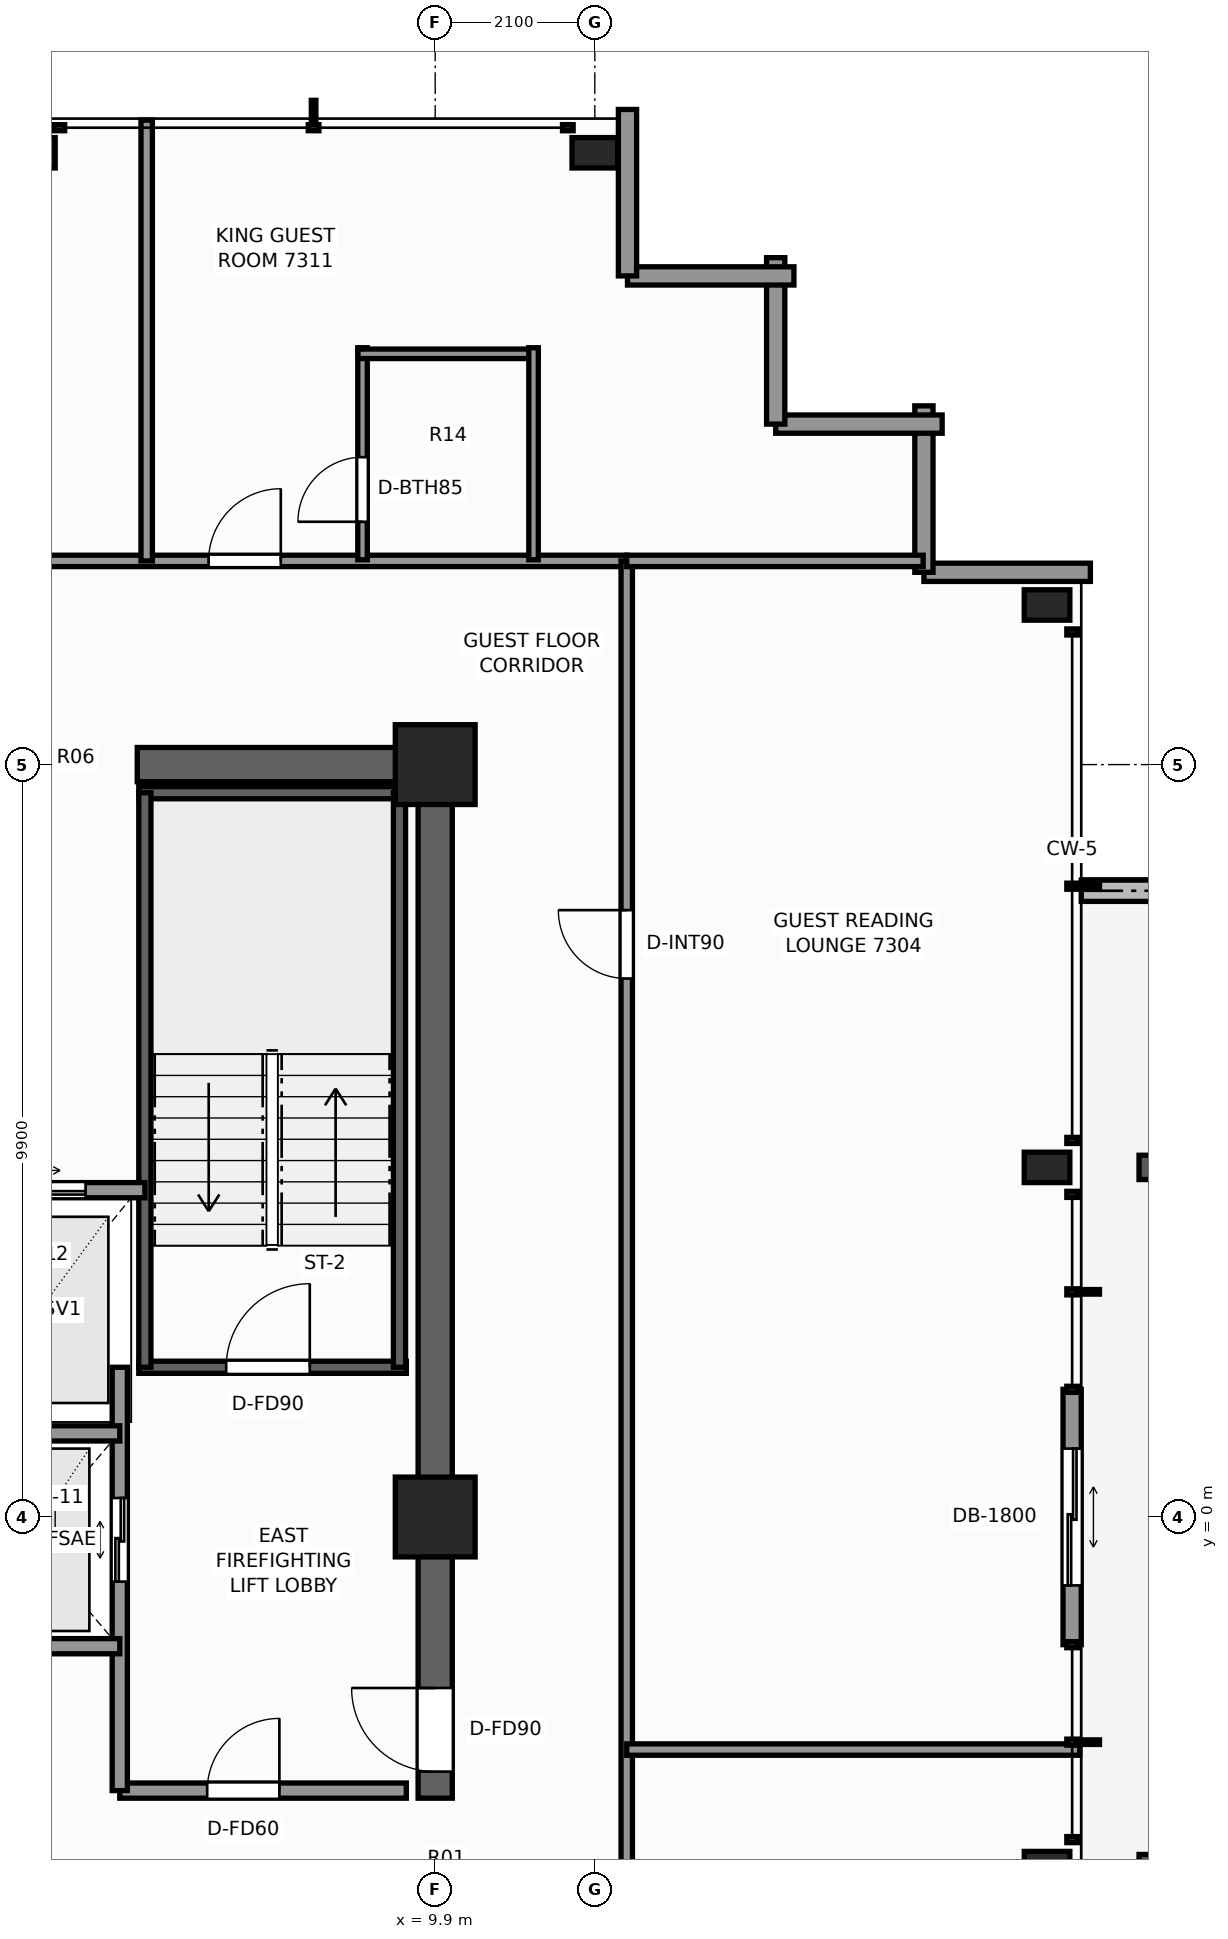
"""IFC4 building model, lengths in metres.
Left out: names, types, materials, properties, quantities, classifications, styles, units other than length and angle.
Written with IfcOpenShell. Run it as: python <this file> out.ifc"""

import sys

from ifc_helpers import new_model, si_unit, direction, frame, frame_2d, origin, origin_2d, place, context, subcontext, project, spatial, rectangle, extrude, element, fill, save


model = new_model("IFC4")
c1 = context("Model", 3, precision=1e-05, world=origin(), true_north=direction((0.0, 1.0)))
c2 = subcontext(c1, "Body", "Model", "MODEL_VIEW")
j1 = project(units=[si_unit("LENGTHUNIT", "METRE"), si_unit("PLANEANGLEUNIT", "RADIAN")], contexts=[c1])
p1 = place(None, origin())
s1 = spatial("IfcSite", under=j1, at=p1, CompositionType="ELEMENT")
p2 = place(p1, origin())
s2 = spatial("IfcBuilding", under=s1, at=p2, CompositionType="ELEMENT")
p3 = place(p2, frame((0.0, 0.0, 251.4)))
s3 = spatial("IfcBuildingStorey", under=s2, at=p3, CompositionType="ELEMENT", Elevation=251.4)
p4 = place(p3, frame((5.98, 9.9, 0.0), z_axis=(0.0, 0.0, 1.0), x_axis=(1.0, 0.0, 0.0)))
e1 = element("IfcWall", 1, at=p4, inside=s3, PredefinedType="SHEAR", context=c2, shape_type="SweptSolid", body=[
    extrude(rectangle(XDim=4.145, YDim=0.45, at=frame_2d((2.073, 0.0))), origin(), (0.0, 0.0, 1.0), 3.5),
])
p5 = place(p3, frame((9.9, -3.7, 0.0), z_axis=(0.0, 0.0, 1.0), x_axis=(0.0, 1.0, 0.0)))
e2 = element("IfcWall", 2, at=p5, inside=s3, PredefinedType="SHEAR", context=c2, shape_type="SweptSolid", body=[
    extrude(rectangle(XDim=13.375, YDim=0.45, at=frame_2d((6.688, 0.0))), origin(), (0.0, 0.0, 1.0), 3.5),
])
p6 = place(p5, frame((0.35, 0.0, 0.0)))
e3 = element("IfcOpeningElement", 3, at=p6, cuts=e2, PredefinedType="OPENING", context=c2, shape_type="SweptSolid", body=[
    extrude(rectangle(XDim=1.1, YDim=2.2, at=frame_2d((0.55, 1.1))), frame((0.0, 0.235, 0.0), z_axis=(0.0, -1.0, 0.0), x_axis=(1.0, 0.0, 0.0)), (0.0, 0.0, 1.0), 0.47),
])
for number, where, z_axis, x_axis in (
    (4, (9.9, 9.9, 0.0), (0.0, 0.0, 1.0), (1.0, 0.0, 0.0)),
    (5, (9.9, 0.0, 0.0), (0.0, 0.0, 1.0), (1.0, 0.0, 0.0)),
):
    element("IfcColumn", number, at=place(p3, frame(where, z_axis=z_axis, x_axis=x_axis)), inside=s3, PredefinedType="COLUMN", context=c2, shape_type="SweptSolid", body=[
        extrude(rectangle(XDim=1.05, YDim=1.05, at=origin_2d()), origin(), (0.0, 0.0, 1.0), 3.5),
    ])
for number, where, z_axis, x_axis in (
    (6, (4.6, 17.95, 0.0), (0.0, 0.0, 1.0), (1.0, 0.0, 0.0)),
    (7, (12.0, 17.95, 0.0), (0.0, 0.0, 1.0), (1.0, 0.0, 0.0)),
    (8, (17.95, -4.6, 0.0), (0.0, 0.0, 1.0), (1.0, 0.0, 0.0)),
    (9, (17.95, 4.6, 0.0), (0.0, 0.0, 1.0), (1.0, 0.0, 0.0)),
    (10, (17.95, 12.0, 0.0), (0.0, 0.0, 1.0), (1.0, 0.0, 0.0)),
):
    element("IfcColumn", number, at=place(p3, frame(where, z_axis=z_axis, x_axis=x_axis)), inside=s3, PredefinedType="COLUMN", context=c2, shape_type="SweptSolid", body=[
        extrude(rectangle(XDim=0.6, YDim=0.4, at=origin_2d()), origin(), (0.0, 0.0, 1.0), 3.5),
    ])
p7 = place(p3, frame((20.105, 8.24, -0.07), z_axis=(0.0, 0.0, 1.0), x_axis=(-1.0, 0.0, 0.0)))
e11 = element("IfcWall", 11, at=p7, inside=s3, PredefinedType="PARAPET", context=c2, shape_type="SweptSolid", body=[
    extrude(rectangle(XDim=1.705, YDim=0.28, at=frame_2d((0.853, 0.0))), origin(), (0.0, 0.0, 1.0), 0.42),
])
p8 = place(p3, frame((18.28, 1.68, 0.0), z_axis=(0.0, 0.0, 1.0), x_axis=(0.0, -1.0, 0.0)))
e12 = element("IfcWall", 12, at=p8, inside=s3, PredefinedType="STANDARD", context=c2, shape_type="SweptSolid", body=[
    extrude(rectangle(XDim=3.36, YDim=0.24, at=frame_2d((1.68, 0.0))), origin(), (0.0, 0.0, 1.0), 3.25),
])
p9 = place(p8, frame((0.78, 0.0, 0.0)))
e13 = element("IfcOpeningElement", 13, at=p9, cuts=e12, PredefinedType="OPENING", context=c2, shape_type="SweptSolid", body=[
    extrude(rectangle(XDim=1.8, YDim=2.2, at=frame_2d((0.9, 1.1))), frame((0.0, 0.13, 0.0), z_axis=(0.0, -1.0, 0.0), x_axis=(1.0, 0.0, 0.0)), (0.0, 0.0, 1.0), 0.26),
])
p10 = place(p3, frame((16.33, 12.43, 0.0), z_axis=(0.0, 0.0, 1.0), x_axis=(1.0, 0.0, 0.0)))
e14 = element("IfcWall", 14, at=p10, inside=s3, PredefinedType="STANDARD", context=c2, shape_type="SweptSolid", body=[
    extrude(rectangle(XDim=2.19, YDim=0.24, at=frame_2d((1.095, 0.0))), origin(), (0.0, 0.0, 1.0), 2.633),
])
for number, where, z_axis, x_axis in (
    (15, (16.33, 14.62, 0.0), (0.0, 0.0, 1.0), (0.0, -1.0, 0.0)),
    (16, (14.38, 14.38, 0.0), (0.0, 0.0, 1.0), (1.0, 0.0, 0.0)),
    (17, (14.38, 16.57, 0.0), (0.0, 0.0, 1.0), (0.0, -1.0, 0.0)),
    (18, (12.43, 16.33, 0.0), (0.0, 0.0, 1.0), (1.0, 0.0, 0.0)),
):
    element("IfcWall", number, at=place(p3, frame(where, z_axis=z_axis, x_axis=x_axis)), inside=s3, PredefinedType="STANDARD", context=c2, shape_type="SweptSolid", body=[
        extrude(rectangle(XDim=2.19, YDim=0.24, at=frame_2d((1.095, 0.0))), origin(), (0.0, 0.0, 1.0), 2.633),
    ])
p11 = place(p3, frame((12.43, 18.52, 0.0), z_axis=(0.0, 0.0, 1.0), x_axis=(0.0, -1.0, 0.0)))
e19 = element("IfcWall", 19, at=p11, inside=s3, PredefinedType="STANDARD", context=c2, shape_type="SweptSolid", body=[
    extrude(rectangle(XDim=2.19, YDim=0.24, at=frame_2d((1.095, 0.0))), origin(), (0.0, 0.0, 1.0), 2.633),
])
p12 = place(p3, frame((6.0, 1.97, 0.0), z_axis=(0.0, 0.0, 1.0), x_axis=(1.0, 0.0, 0.0)))
e20 = element("IfcWall", 20, at=p12, inside=s3, PredefinedType="SHEAR", context=c2, shape_type="SweptSolid", body=[
    extrude(rectangle(XDim=3.52, YDim=0.16, at=frame_2d((1.76, 0.0))), origin(), (0.0, 0.0, 1.0), 3.5),
])
p13 = place(p12, frame((1.15, 0.0, 0.0)))
e21 = element("IfcOpeningElement", 21, at=p13, cuts=e20, PredefinedType="OPENING", context=c2, shape_type="SweptSolid", body=[
    extrude(rectangle(XDim=1.1, YDim=2.2, at=frame_2d((0.55, 1.1))), frame((0.0, 0.09, 0.0), z_axis=(0.0, -1.0, 0.0), x_axis=(1.0, 0.0, 0.0)), (0.0, 0.0, 1.0), 0.18),
])
p14 = place(p3, frame((6.0, 9.53, 0.0), z_axis=(0.0, 0.0, 1.0), x_axis=(1.0, 0.0, 0.0)))
e22 = element("IfcWall", 22, at=p14, inside=s3, PredefinedType="SHEAR", context=c2, shape_type="SweptSolid", body=[
    extrude(rectangle(XDim=3.52, YDim=0.16, at=frame_2d((1.76, 0.0))), origin(), (0.0, 0.0, 1.0), 3.5),
])
for number, where, z_axis, x_axis in (
    (23, (6.08, 1.97, 0.0), (0.0, 0.0, 1.0), (0.0, 1.0, 0.0)),
    (24, (9.43, 1.97, 0.0), (0.0, 0.0, 1.0), (0.0, 1.0, 0.0)),
):
    element("IfcWall", number, at=place(p3, frame(where, z_axis=z_axis, x_axis=x_axis)), inside=s3, PredefinedType="SHEAR", context=c2, shape_type="SweptSolid", body=[
        extrude(rectangle(XDim=7.56, YDim=0.16, at=frame_2d((3.78, 0.0))), origin(), (0.0, 0.0, 1.0), 3.5),
    ])
p15 = place(p3, frame((5.75, -3.6, 0.0), z_axis=(0.0, 0.0, 1.0), x_axis=(1.0, 0.0, 0.0)))
e25 = element("IfcWall", 25, at=p15, inside=s3, PredefinedType="SOLIDWALL", context=c2, shape_type="SweptSolid", body=[
    extrude(rectangle(XDim=3.77, YDim=0.2, at=frame_2d((1.885, 0.0))), origin(), (0.0, 0.0, 1.0), 3.25),
])
p16 = place(p15, frame((1.15, 0.0, 0.0)))
e26 = element("IfcOpeningElement", 26, at=p16, cuts=e25, PredefinedType="OPENING", context=c2, shape_type="SweptSolid", body=[
    extrude(rectangle(XDim=0.95, YDim=2.06, at=frame_2d((0.475, 1.03))), frame((0.0, 0.11, 0.0), z_axis=(0.0, -1.0, 0.0), x_axis=(1.0, 0.0, 0.0)), (0.0, 0.0, 1.0), 0.22),
])
p17 = place(p3, frame((5.75, -3.6, 0.0), z_axis=(0.0, 0.0, 1.0), x_axis=(0.0, 1.0, 0.0)))
e27 = element("IfcWall", 27, at=p17, inside=s3, PredefinedType="SOLIDWALL", context=c2, shape_type="SweptSolid", body=[
    extrude(rectangle(XDim=5.57, YDim=0.2, at=frame_2d((2.785, 0.0))), origin(), (0.0, 0.0, 1.0), 3.25),
])
p18 = place(p17, frame((2.75, 0.0, 0.0)))
e28 = element("IfcOpeningElement", 28, at=p18, cuts=e27, PredefinedType="OPENING", context=c2, shape_type="SweptSolid", body=[
    extrude(rectangle(XDim=1.1, YDim=2.2, at=frame_2d((0.55, 1.1))), frame((0.0, 0.11, 0.0), z_axis=(0.0, -1.0, 0.0), x_axis=(1.0, 0.0, 0.0)), (0.0, 0.0, 1.0), 0.22),
])
for number, where, z_axis, x_axis in (
    (29, (3.35, -1.7, 0.0), (0.0, 0.0, 1.0), (1.0, 0.0, 0.0)),
    (30, (3.35, 1.1, 0.0), (0.0, 0.0, 1.0), (1.0, 0.0, 0.0)),
):
    element("IfcWall", number, at=place(p3, frame(where, z_axis=z_axis, x_axis=x_axis)), inside=s3, PredefinedType="SOLIDWALL", context=c2, shape_type="SweptSolid", body=[
        extrude(rectangle(XDim=2.4, YDim=0.2, at=frame_2d((1.2, 0.0))), origin(), (0.0, 0.0, 1.0), 3.25),
    ])
p19 = place(p3, frame((3.35, 4.3, 0.0), z_axis=(0.0, 0.0, 1.0), x_axis=(1.0, 0.0, 0.0)))
e31 = element("IfcWall", 31, at=p19, inside=s3, PredefinedType="SOLIDWALL", context=c2, shape_type="SweptSolid", body=[
    extrude(rectangle(XDim=2.73, YDim=0.2, at=frame_2d((1.365, 0.0))), origin(), (0.0, 0.0, 1.0), 3.25),
])
p20 = place(p19, frame((0.75, 0.0, 0.0)))
e32 = element("IfcOpeningElement", 32, at=p20, cuts=e31, PredefinedType="OPENING", context=c2, shape_type="SweptSolid", body=[
    extrude(rectangle(XDim=1.2, YDim=2.25, at=frame_2d((0.6, 1.125))), frame((0.0, 0.11, 0.0), z_axis=(0.0, -1.0, 0.0), x_axis=(1.0, 0.0, 0.0)), (0.0, 0.0, 1.0), 0.22),
])
p21 = place(p3, frame((-12.26, 12.58, 0.0), z_axis=(0.0, 0.0, 1.0), x_axis=(1.0, 0.0, 0.0)))
e33 = element("IfcWall", 33, at=p21, inside=s3, PredefinedType="PARTITIONING", context=c2, shape_type="SweptSolid", body=[
    extrude(rectangle(XDim=24.68, YDim=0.15, at=frame_2d((12.34, 0.0))), origin(), (0.0, 0.0, 1.0), 2.539),
])
p22 = place(p21, frame((3.188, 0.0, 0.0)))
e34 = element("IfcOpeningElement", 34, at=p22, cuts=e33, PredefinedType="OPENING", context=c2, shape_type="SweptSolid", body=[
    extrude(rectangle(XDim=0.95, YDim=2.06, at=frame_2d((0.475, 1.03))), frame((0.0, 0.085, 0.0), z_axis=(0.0, -1.0, 0.0), x_axis=(1.0, 0.0, 0.0)), (0.0, 0.0, 1.0), 0.17),
])
p23 = place(p21, frame((13.815, 0.0, 0.0)))
e35 = element("IfcOpeningElement", 35, at=p23, cuts=e33, PredefinedType="OPENING", context=c2, shape_type="SweptSolid", body=[
    extrude(rectangle(XDim=0.95, YDim=2.06, at=frame_2d((0.475, 1.03))), frame((0.0, 0.085, 0.0), z_axis=(0.0, -1.0, 0.0), x_axis=(1.0, 0.0, 0.0)), (0.0, 0.0, 1.0), 0.17),
])
p24 = place(p21, frame((19.178, 0.0, 0.0)))
e36 = element("IfcOpeningElement", 36, at=p24, cuts=e33, PredefinedType="OPENING", context=c2, shape_type="SweptSolid", body=[
    extrude(rectangle(XDim=0.95, YDim=2.06, at=frame_2d((0.475, 1.03))), frame((0.0, 0.085, 0.0), z_axis=(0.0, -1.0, 0.0), x_axis=(1.0, 0.0, 0.0)), (0.0, 0.0, 1.0), 0.17),
])
p25 = place(p3, frame((12.42, -12.26, 0.0), z_axis=(0.0, 0.0, 1.0), x_axis=(0.0, 1.0, 0.0)))
e37 = element("IfcWall", 37, at=p25, inside=s3, PredefinedType="PARTITIONING", context=c2, shape_type="SweptSolid", body=[
    extrude(rectangle(XDim=24.84, YDim=0.15, at=frame_2d((12.42, 0.0))), origin(), (0.0, 0.0, 1.0), 2.539),
])
p26 = place(p25, frame((4.275, 0.0, 0.0)))
e38 = element("IfcOpeningElement", 38, at=p26, cuts=e37, PredefinedType="OPENING", context=c2, shape_type="SweptSolid", body=[
    extrude(rectangle(XDim=0.9, YDim=2.06, at=frame_2d((0.45, 1.03))), frame((0.0, 0.085, 0.0), z_axis=(0.0, -1.0, 0.0), x_axis=(1.0, 0.0, 0.0)), (0.0, 0.0, 1.0), 0.17),
])
p27 = place(p25, frame((19.345, 0.0, 0.0)))
e39 = element("IfcOpeningElement", 39, at=p27, cuts=e37, PredefinedType="OPENING", context=c2, shape_type="SweptSolid", body=[
    extrude(rectangle(XDim=0.9, YDim=2.06, at=frame_2d((0.45, 1.03))), frame((0.0, 0.085, 0.0), z_axis=(0.0, -1.0, 0.0), x_axis=(1.0, 0.0, 0.0)), (0.0, 0.0, 1.0), 0.17),
])
p28 = place(p3, frame((12.42, 12.58, 0.0), z_axis=(0.0, 0.0, 1.0), x_axis=(1.0, 0.0, 0.0)))
e40 = element("IfcWall", 40, at=p28, inside=s3, PredefinedType="PARTITIONING", context=c2, shape_type="SweptSolid", body=[
    extrude(rectangle(XDim=3.9, YDim=0.15, at=frame_2d((1.95, 0.0))), origin(), (0.0, 0.0, 1.0), 3.25),
])
p29 = place(p3, frame((12.42, -3.06, 0.0), z_axis=(0.0, 0.0, 1.0), x_axis=(1.0, 0.0, 0.0)))
e41 = element("IfcWall", 41, at=p29, inside=s3, PredefinedType="PARTITIONING", context=c2, shape_type="SweptSolid", body=[
    extrude(rectangle(XDim=5.96, YDim=0.15, at=frame_2d((2.98, 0.0))), origin(), (0.0, 0.0, 1.0), 2.623),
])
p30 = place(p3, frame((6.104, 12.58, 0.0), z_axis=(0.0, 0.0, 1.0), x_axis=(0.0, 1.0, 0.0)))
e42 = element("IfcWall", 42, at=p30, inside=s3, PredefinedType="PARTITIONING", context=c2, shape_type="SweptSolid", body=[
    extrude(rectangle(XDim=5.8, YDim=0.15, at=frame_2d((2.9, 0.0))), origin(), (0.0, 0.0, 1.0), 2.623),
])
p31 = place(p3, frame((8.944, 12.595, 0.0), z_axis=(0.0, 0.0, 1.0), x_axis=(0.0, 1.0, 0.0)))
e43 = element("IfcWall", 43, at=p31, inside=s3, PredefinedType="PARTITIONING", context=c2, shape_type="SweptSolid", body=[
    extrude(rectangle(XDim=2.79, YDim=0.125, at=frame_2d((1.395, 0.0))), origin(), (0.0, 0.0, 1.0), 3.25),
])
p32 = place(p31, frame((0.5, 0.0, 0.0)))
e44 = element("IfcOpeningElement", 44, at=p32, cuts=e43, PredefinedType="OPENING", context=c2, shape_type="SweptSolid", body=[
    extrude(rectangle(XDim=0.85, YDim=2.03, at=frame_2d((0.425, 1.015))), frame((0.0, 0.073, 0.0), z_axis=(0.0, -1.0, 0.0), x_axis=(1.0, 0.0, 0.0)), (0.0, 0.0, 1.0), 0.145),
])
p33 = place(p3, frame((8.884, 15.305, 0.0), z_axis=(0.0, 0.0, 1.0), x_axis=(1.0, 0.0, 0.0)))
e45 = element("IfcWall", 45, at=p33, inside=s3, PredefinedType="PARTITIONING", context=c2, shape_type="SweptSolid", body=[
    extrude(rectangle(XDim=2.37, YDim=0.125, at=frame_2d((1.185, 0.0))), origin(), (0.0, 0.0, 1.0), 2.539),
])
p34 = place(p3, frame((11.194, 12.595, 0.0), z_axis=(0.0, 0.0, 1.0), x_axis=(0.0, 1.0, 0.0)))
e46 = element("IfcWall", 46, at=p34, inside=s3, PredefinedType="PARTITIONING", context=c2, shape_type="SweptSolid", body=[
    extrude(rectangle(XDim=2.79, YDim=0.125, at=frame_2d((1.395, 0.0))), origin(), (0.0, 0.0, 1.0), 2.539),
])
p35 = place(p9, origin())
e47 = element("IfcDoor", 47, at=p35, inside=s3, OperationType="DOUBLE_DOOR_SLIDING", PredefinedType="DOOR", context=c2, shape_type="SweptSolid", body=[
    extrude(rectangle(XDim=1.8, YDim=2.2, at=frame_2d((0.9, 1.1))), frame((0.0, 0.025, 0.0), z_axis=(0.0, -1.0, 0.0), x_axis=(1.0, 0.0, 0.0)), (0.0, 0.0, 1.0), 0.05),
])
fill(e13, e47)
p36 = place(p13, origin())
e48 = element("IfcDoor", 48, at=p36, inside=s3, OperationType="SINGLE_SWING_RIGHT", PredefinedType="DOOR", context=c2, shape_type="SweptSolid", body=[
    extrude(rectangle(XDim=1.1, YDim=2.2, at=frame_2d((0.55, 1.1))), frame((0.0, 0.025, 0.0), z_axis=(0.0, -1.0, 0.0), x_axis=(1.0, 0.0, 0.0)), (0.0, 0.0, 1.0), 0.05),
])
fill(e21, e48)
p37 = place(p6, origin())
e49 = element("IfcDoor", 49, at=p37, inside=s3, OperationType="SINGLE_SWING_RIGHT", PredefinedType="DOOR", context=c2, shape_type="SweptSolid", body=[
    extrude(rectangle(XDim=1.1, YDim=2.2, at=frame_2d((0.55, 1.1))), frame((0.0, 0.025, 0.0), z_axis=(0.0, -1.0, 0.0), x_axis=(1.0, 0.0, 0.0)), (0.0, 0.0, 1.0), 0.05),
])
fill(e3, e49)
p38 = place(p18, origin())
e50 = element("IfcDoor", 50, at=p38, inside=s3, OperationType="DOUBLE_DOOR_SLIDING", PredefinedType="DOOR", context=c2, shape_type="SweptSolid", body=[
    extrude(rectangle(XDim=1.1, YDim=2.2, at=frame_2d((0.55, 1.1))), frame((0.0, 0.025, 0.0), z_axis=(0.0, -1.0, 0.0), x_axis=(1.0, 0.0, 0.0)), (0.0, 0.0, 1.0), 0.05),
])
fill(e28, e50)
p39 = place(p20, origin())
e51 = element("IfcDoor", 51, at=p39, inside=s3, OperationType="DOUBLE_DOOR_SLIDING", PredefinedType="DOOR", context=c2, shape_type="SweptSolid", body=[
    extrude(rectangle(XDim=1.2, YDim=2.25, at=frame_2d((0.6, 1.125))), frame((0.0, 0.025, 0.0), z_axis=(0.0, -1.0, 0.0), x_axis=(1.0, 0.0, 0.0)), (0.0, 0.0, 1.0), 0.05),
])
fill(e32, e51)
p40 = place(p16, origin())
e52 = element("IfcDoor", 52, at=p40, inside=s3, OperationType="SINGLE_SWING_RIGHT", PredefinedType="DOOR", context=c2, shape_type="SweptSolid", body=[
    extrude(rectangle(XDim=0.95, YDim=2.06, at=frame_2d((0.475, 1.03))), frame((0.0, 0.025, 0.0), z_axis=(0.0, -1.0, 0.0), x_axis=(1.0, 0.0, 0.0)), (0.0, 0.0, 1.0), 0.05),
])
fill(e26, e52)
p41 = place(p27, origin())
e53 = element("IfcDoor", 53, at=p41, inside=s3, OperationType="SINGLE_SWING_RIGHT", PredefinedType="DOOR", context=c2, shape_type="SweptSolid", body=[
    extrude(rectangle(XDim=0.9, YDim=2.06, at=frame_2d((0.45, 1.03))), frame((0.0, 0.025, 0.0), z_axis=(0.0, -1.0, 0.0), x_axis=(1.0, 0.0, 0.0)), (0.0, 0.0, 1.0), 0.05),
])
fill(e39, e53)
p42 = place(p32, origin())
e54 = element("IfcDoor", 54, at=p42, inside=s3, OperationType="SINGLE_SWING_LEFT", PredefinedType="DOOR", context=c2, shape_type="SweptSolid", body=[
    extrude(rectangle(XDim=0.85, YDim=2.03, at=frame_2d((0.425, 1.015))), frame((0.0, 0.025, 0.0), z_axis=(0.0, -1.0, 0.0), x_axis=(1.0, 0.0, 0.0)), (0.0, 0.0, 1.0), 0.05),
])
fill(e44, e54)
p43 = place(p24, origin())
e55 = element("IfcDoor", 55, at=p43, inside=s3, OperationType="SINGLE_SWING_RIGHT", PredefinedType="DOOR", context=c2, shape_type="SweptSolid", body=[
    extrude(rectangle(XDim=0.95, YDim=2.06, at=frame_2d((0.475, 1.03))), frame((0.0, 0.025, 0.0), z_axis=(0.0, -1.0, 0.0), x_axis=(1.0, 0.0, 0.0)), (0.0, 0.0, 1.0), 0.05),
])
fill(e36, e55)
save(model, sys.argv[1])
